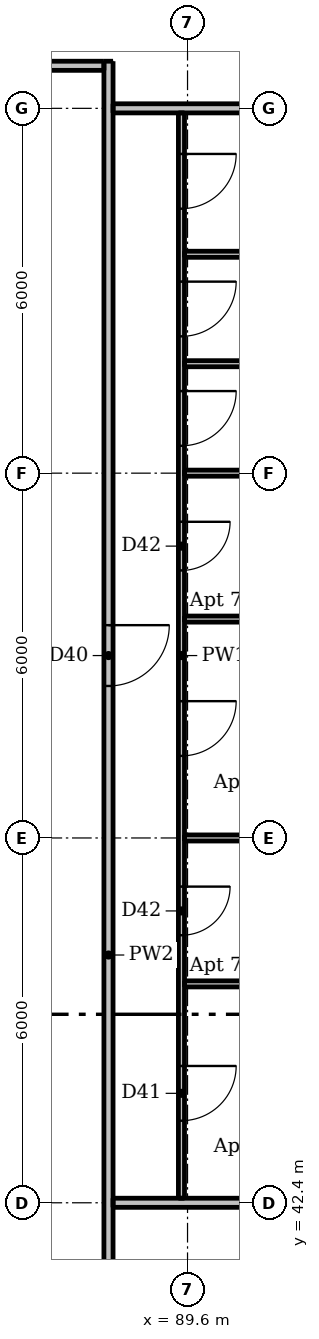
"""IFC4 building model, lengths in metres.
Left out: names, types, materials, properties, quantities, classifications, styles, units other than length and angle.
Written with IfcOpenShell. Run it as: python <this file> out.ifc"""

import sys

from ifc_helpers import new_model, si_unit, direction, frame, frame_2d, origin, place, context, subcontext, project, spatial, rectangle, extrude, element, fill, save


model = new_model("IFC4")
c1 = context("Model", 3, precision=1e-05, world=origin(), true_north=direction((0.0, 1.0)))
c2 = subcontext(c1, "Body", "Model", "MODEL_VIEW")
j1 = project(units=[si_unit("LENGTHUNIT", "METRE"), si_unit("PLANEANGLEUNIT", "RADIAN")], contexts=[c1])
p1 = place(None, origin())
s1 = spatial("IfcSite", under=j1, at=p1, CompositionType="ELEMENT")
p2 = place(p1, origin())
s2 = spatial("IfcBuilding", under=s1, at=p2, CompositionType="ELEMENT")
p3 = place(p2, frame((0.0, 0.0, 262.0)))
s3 = spatial("IfcBuildingStorey", under=s2, at=p3, CompositionType="ELEMENT", Elevation=262.0)
p4 = place(p3, frame((89.5, 60.325, 0.0), z_axis=(0.0, 0.0, 1.0), x_axis=(0.0, -1.0, 0.0)))
e1 = element("IfcWall", 1, at=p4, inside=s3, PredefinedType="PARTITIONING", context=c2, shape_type="SweptSolid", body=[
    extrude(rectangle(XDim=17.85, YDim=0.1, at=frame_2d((8.925, 0.0))), origin(), (0.0, 0.0, 1.0), 3.05),
])
p5 = place(p4, frame((4.575, 0.0, 0.0)))
e2 = element("IfcOpeningElement", 2, at=p5, cuts=e1, PredefinedType="OPENING", context=c2, shape_type="SweptSolid", body=[
    extrude(rectangle(XDim=0.9, YDim=2.1, at=frame_2d((0.45, 1.05))), frame((0.0, 0.06, 0.0), z_axis=(0.0, -1.0, 0.0), x_axis=(1.0, 0.0, 0.0)), (0.0, 0.0, 1.0), 0.12),
])
p6 = place(p4, frame((0.675, 0.0, 0.0)))
e3 = element("IfcOpeningElement", 3, at=p6, cuts=e1, PredefinedType="OPENING", context=c2, shape_type="SweptSolid", body=[
    extrude(rectangle(XDim=0.9, YDim=2.1, at=frame_2d((0.45, 1.05))), frame((0.0, 0.06, 0.0), z_axis=(0.0, -1.0, 0.0), x_axis=(1.0, 0.0, 0.0)), (0.0, 0.0, 1.0), 0.12),
])
p7 = place(p4, frame((2.775, 0.0, 0.0)))
e4 = element("IfcOpeningElement", 4, at=p7, cuts=e1, PredefinedType="OPENING", context=c2, shape_type="SweptSolid", body=[
    extrude(rectangle(XDim=0.9, YDim=2.1, at=frame_2d((0.45, 1.05))), frame((0.0, 0.06, 0.0), z_axis=(0.0, -1.0, 0.0), x_axis=(1.0, 0.0, 0.0)), (0.0, 0.0, 1.0), 0.12),
])
p8 = place(p4, frame((15.675, 0.0, 0.0)))
e5 = element("IfcOpeningElement", 5, at=p8, cuts=e1, PredefinedType="OPENING", context=c2, shape_type="SweptSolid", body=[
    extrude(rectangle(XDim=0.9, YDim=2.1, at=frame_2d((0.45, 1.05))), frame((0.0, 0.06, 0.0), z_axis=(0.0, -1.0, 0.0), x_axis=(1.0, 0.0, 0.0)), (0.0, 0.0, 1.0), 0.12),
])
p9 = place(p4, frame((9.675, 0.0, 0.0)))
e6 = element("IfcOpeningElement", 6, at=p9, cuts=e1, PredefinedType="OPENING", context=c2, shape_type="SweptSolid", body=[
    extrude(rectangle(XDim=0.9, YDim=2.1, at=frame_2d((0.45, 1.05))), frame((0.0, 0.06, 0.0), z_axis=(0.0, -1.0, 0.0), x_axis=(1.0, 0.0, 0.0)), (0.0, 0.0, 1.0), 0.12),
])
p10 = place(p4, frame((12.725, 0.0, 0.0)))
e7 = element("IfcOpeningElement", 7, at=p10, cuts=e1, PredefinedType="OPENING", context=c2, shape_type="SweptSolid", body=[
    extrude(rectangle(XDim=0.8, YDim=2.1, at=frame_2d((0.4, 1.05))), frame((0.0, 0.06, 0.0), z_axis=(0.0, -1.0, 0.0), x_axis=(1.0, 0.0, 0.0)), (0.0, 0.0, 1.0), 0.12),
])
p11 = place(p4, frame((6.725, 0.0, 0.0)))
e8 = element("IfcOpeningElement", 8, at=p11, cuts=e1, PredefinedType="OPENING", context=c2, shape_type="SweptSolid", body=[
    extrude(rectangle(XDim=0.8, YDim=2.1, at=frame_2d((0.4, 1.05))), frame((0.0, 0.06, 0.0), z_axis=(0.0, -1.0, 0.0), x_axis=(1.0, 0.0, 0.0)), (0.0, 0.0, 1.0), 0.12),
])
for number, where, z_axis, x_axis in (
    (9, (89.55, 58.0, 0.0), (0.0, 0.0, 1.0), (1.0, 0.0, 0.0)),
    (10, (89.55, 56.2, 0.0), (0.0, 0.0, 1.0), (1.0, 0.0, 0.0)),
):
    element("IfcWall", number, at=place(p3, frame(where, z_axis=z_axis, x_axis=x_axis)), inside=s3, PredefinedType="PARTITIONING", context=c2, shape_type="SweptSolid", body=[
        extrude(rectangle(XDim=2.8, YDim=0.1, at=frame_2d((1.4, 0.0))), origin(), (0.0, 0.0, 1.0), 3.05),
    ])
p12 = place(p3, frame((89.55, 54.4, 0.0), z_axis=(0.0, 0.0, 1.0), x_axis=(1.0, 0.0, 0.0)))
e11 = element("IfcWall", 11, at=p12, inside=s3, PredefinedType="PARTITIONING", context=c2, shape_type="SweptSolid", body=[
    extrude(rectangle(XDim=5.45, YDim=0.1, at=frame_2d((2.725, 0.0))), origin(), (0.0, 0.0, 1.0), 2.59),
])
p13 = place(p3, frame((89.55, 52.0, 0.0), z_axis=(0.0, 0.0, 1.0), x_axis=(1.0, 0.0, 0.0)))
e12 = element("IfcWall", 12, at=p13, inside=s3, PredefinedType="PARTITIONING", context=c2, shape_type="SweptSolid", body=[
    extrude(rectangle(XDim=2.8, YDim=0.1, at=frame_2d((1.4, 0.0))), origin(), (0.0, 0.0, 1.0), 3.05),
])
p14 = place(p3, frame((89.55, 48.4, 0.0), z_axis=(0.0, 0.0, 1.0), x_axis=(1.0, 0.0, 0.0)))
e13 = element("IfcWall", 13, at=p14, inside=s3, PredefinedType="PARTITIONING", context=c2, shape_type="SweptSolid", body=[
    extrude(rectangle(XDim=5.45, YDim=0.1, at=frame_2d((2.725, 0.0))), origin(), (0.0, 0.0, 1.0), 2.59),
])
p15 = place(p3, frame((89.55, 46.0, 0.0), z_axis=(0.0, 0.0, 1.0), x_axis=(1.0, 0.0, 0.0)))
e14 = element("IfcWall", 14, at=p15, inside=s3, PredefinedType="PARTITIONING", context=c2, shape_type="SweptSolid", body=[
    extrude(rectangle(XDim=2.8, YDim=0.1, at=frame_2d((1.4, 0.0))), origin(), (0.0, 0.0, 1.0), 3.05),
])
p16 = place(p3, frame((88.3, 61.175, 0.0), z_axis=(0.0, 0.0, 1.0), x_axis=(0.0, -1.0, 0.0)))
e15 = element("IfcWall", 15, at=p16, inside=s3, PredefinedType="PARTITIONING", context=c2, shape_type="SweptSolid", body=[
    extrude(rectangle(XDim=29.4, YDim=0.15, at=frame_2d((14.7, 0.0))), origin(), (0.0, 0.0, 1.0), 3.05),
])
p17 = place(p16, frame((26.625, 0.0, 0.0)))
e16 = element("IfcOpeningElement", 16, at=p17, cuts=e15, PredefinedType="OPENING", context=c2, shape_type="SweptSolid", body=[
    extrude(rectangle(XDim=1.0, YDim=2.1, at=frame_2d((0.5, 1.05))), frame((0.0, 0.085, 0.0), z_axis=(0.0, -1.0, 0.0), x_axis=(1.0, 0.0, 0.0)), (0.0, 0.0, 1.0), 0.17),
])
p18 = place(p16, frame((9.275, 0.0, 0.0)))
e17 = element("IfcOpeningElement", 17, at=p18, cuts=e15, PredefinedType="OPENING", context=c2, shape_type="SweptSolid", body=[
    extrude(rectangle(XDim=1.0, YDim=2.1, at=frame_2d((0.5, 1.05))), frame((0.0, 0.085, 0.0), z_axis=(0.0, -1.0, 0.0), x_axis=(1.0, 0.0, 0.0)), (0.0, 0.0, 1.0), 0.17),
])
p19 = place(p3, frame((58.975, 61.1, 0.0), z_axis=(0.0, 0.0, 1.0), x_axis=(1.0, 0.0, 0.0)))
e18 = element("IfcWall", 18, at=p19, inside=s3, PredefinedType="PARTITIONING", context=c2, shape_type="SweptSolid", body=[
    extrude(rectangle(XDim=29.25, YDim=0.15, at=frame_2d((14.625, 0.0))), origin(), (0.0, 0.0, 1.0), 3.05),
])
p20 = place(p19, frame((4.325, 0.0, 0.0)))
e19 = element("IfcOpeningElement", 19, at=p20, cuts=e18, PredefinedType="OPENING", context=c2, shape_type="SweptSolid", body=[
    extrude(rectangle(XDim=1.0, YDim=2.1, at=frame_2d((0.5, 1.05))), frame((0.0, 0.085, 0.0), z_axis=(0.0, -1.0, 0.0), x_axis=(1.0, 0.0, 0.0)), (0.0, 0.0, 1.0), 0.17),
])
p21 = place(p19, frame((15.125, 0.0, 0.0)))
e20 = element("IfcOpeningElement", 20, at=p21, cuts=e18, PredefinedType="OPENING", context=c2, shape_type="SweptSolid", body=[
    extrude(rectangle(XDim=1.0, YDim=2.1, at=frame_2d((0.5, 1.05))), frame((0.0, 0.085, 0.0), z_axis=(0.0, -1.0, 0.0), x_axis=(1.0, 0.0, 0.0)), (0.0, 0.0, 1.0), 0.17),
])
p22 = place(p19, frame((26.475, 0.0, 0.0)))
e21 = element("IfcOpeningElement", 21, at=p22, cuts=e18, PredefinedType="OPENING", context=c2, shape_type="SweptSolid", body=[
    extrude(rectangle(XDim=1.0, YDim=2.1, at=frame_2d((0.5, 1.05))), frame((0.0, 0.085, 0.0), z_axis=(0.0, -1.0, 0.0), x_axis=(1.0, 0.0, 0.0)), (0.0, 0.0, 1.0), 0.17),
])
p23 = place(p3, frame((88.375, 60.4, 0.0), z_axis=(0.0, 0.0, 1.0), x_axis=(1.0, 0.0, 0.0)))
e22 = element("IfcWall", 22, at=p23, inside=s3, PredefinedType="PARTITIONING", context=c2, shape_type="SweptSolid", body=[
    extrude(rectangle(XDim=6.625, YDim=0.15, at=frame_2d((3.312, 0.0))), origin(), (0.0, 0.0, 1.0), 2.647),
])
p24 = place(p3, frame((88.375, 42.4, 0.0), z_axis=(0.0, 0.0, 1.0), x_axis=(1.0, 0.0, 0.0)))
e23 = element("IfcWall", 23, at=p24, inside=s3, PredefinedType="PARTITIONING", context=c2, shape_type="SweptSolid", body=[
    extrude(rectangle(XDim=6.625, YDim=0.15, at=frame_2d((3.312, 0.0))), origin(), (0.0, 0.0, 1.0), 2.59),
])
p25 = place(p18, origin())
e24 = element("IfcDoor", 24, at=p25, inside=s3, OperationType="SINGLE_SWING_LEFT", PredefinedType="DOOR", context=c2, shape_type="SweptSolid", body=[
    extrude(rectangle(XDim=1.0, YDim=2.1, at=frame_2d((0.5, 1.05))), frame((0.0, 0.025, 0.0), z_axis=(0.0, -1.0, 0.0), x_axis=(1.0, 0.0, 0.0)), (0.0, 0.0, 1.0), 0.05),
])
fill(e17, e24)
p26 = place(p5, origin())
e25 = element("IfcDoor", 25, at=p26, inside=s3, OperationType="SINGLE_SWING_LEFT", PredefinedType="DOOR", context=c2, shape_type="SweptSolid", body=[
    extrude(rectangle(XDim=0.9, YDim=2.1, at=frame_2d((0.45, 1.05))), frame((0.0, 0.025, 0.0), z_axis=(0.0, -1.0, 0.0), x_axis=(1.0, 0.0, 0.0)), (0.0, 0.0, 1.0), 0.05),
])
fill(e2, e25)
p27 = place(p6, origin())
e26 = element("IfcDoor", 26, at=p27, inside=s3, OperationType="SINGLE_SWING_LEFT", PredefinedType="DOOR", context=c2, shape_type="SweptSolid", body=[
    extrude(rectangle(XDim=0.9, YDim=2.1, at=frame_2d((0.45, 1.05))), frame((0.0, 0.025, 0.0), z_axis=(0.0, -1.0, 0.0), x_axis=(1.0, 0.0, 0.0)), (0.0, 0.0, 1.0), 0.05),
])
fill(e3, e26)
p28 = place(p7, origin())
e27 = element("IfcDoor", 27, at=p28, inside=s3, OperationType="SINGLE_SWING_LEFT", PredefinedType="DOOR", context=c2, shape_type="SweptSolid", body=[
    extrude(rectangle(XDim=0.9, YDim=2.1, at=frame_2d((0.45, 1.05))), frame((0.0, 0.025, 0.0), z_axis=(0.0, -1.0, 0.0), x_axis=(1.0, 0.0, 0.0)), (0.0, 0.0, 1.0), 0.05),
])
fill(e4, e27)
p29 = place(p8, origin())
e28 = element("IfcDoor", 28, at=p29, inside=s3, OperationType="SINGLE_SWING_LEFT", PredefinedType="DOOR", context=c2, shape_type="SweptSolid", body=[
    extrude(rectangle(XDim=0.9, YDim=2.1, at=frame_2d((0.45, 1.05))), frame((0.0, 0.025, 0.0), z_axis=(0.0, -1.0, 0.0), x_axis=(1.0, 0.0, 0.0)), (0.0, 0.0, 1.0), 0.05),
])
fill(e5, e28)
p30 = place(p9, origin())
e29 = element("IfcDoor", 29, at=p30, inside=s3, OperationType="SINGLE_SWING_LEFT", PredefinedType="DOOR", context=c2, shape_type="SweptSolid", body=[
    extrude(rectangle(XDim=0.9, YDim=2.1, at=frame_2d((0.45, 1.05))), frame((0.0, 0.025, 0.0), z_axis=(0.0, -1.0, 0.0), x_axis=(1.0, 0.0, 0.0)), (0.0, 0.0, 1.0), 0.05),
])
fill(e6, e29)
p31 = place(p10, origin())
e30 = element("IfcDoor", 30, at=p31, inside=s3, OperationType="SINGLE_SWING_LEFT", PredefinedType="DOOR", context=c2, shape_type="SweptSolid", body=[
    extrude(rectangle(XDim=0.8, YDim=2.1, at=frame_2d((0.4, 1.05))), frame((0.0, 0.025, 0.0), z_axis=(0.0, -1.0, 0.0), x_axis=(1.0, 0.0, 0.0)), (0.0, 0.0, 1.0), 0.05),
])
fill(e7, e30)
p32 = place(p11, origin())
e31 = element("IfcDoor", 31, at=p32, inside=s3, OperationType="SINGLE_SWING_LEFT", PredefinedType="DOOR", context=c2, shape_type="SweptSolid", body=[
    extrude(rectangle(XDim=0.8, YDim=2.1, at=frame_2d((0.4, 1.05))), frame((0.0, 0.025, 0.0), z_axis=(0.0, -1.0, 0.0), x_axis=(1.0, 0.0, 0.0)), (0.0, 0.0, 1.0), 0.05),
])
fill(e8, e31)
save(model, sys.argv[1])
